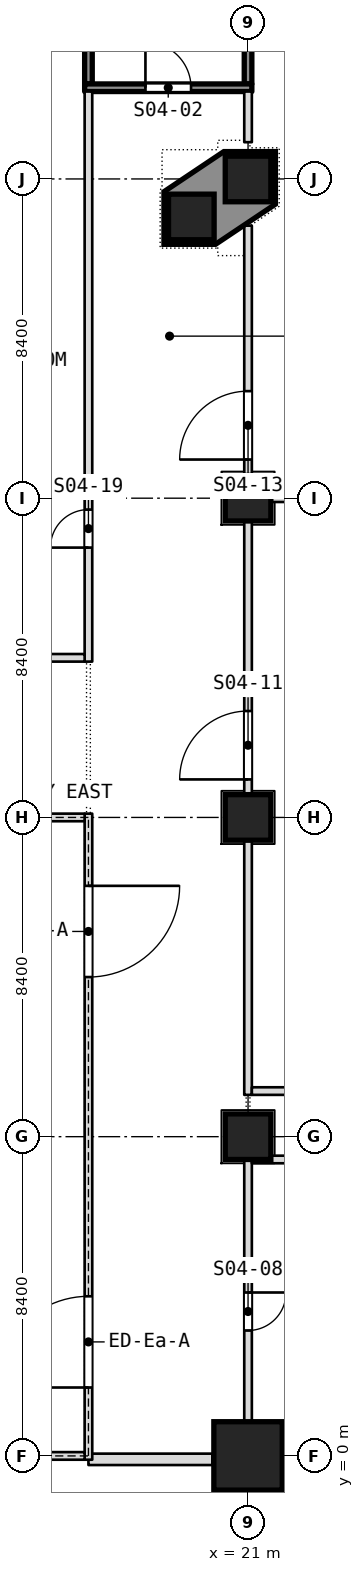
"""IFC4 building model, lengths in metres.
Left out: names, types, materials, properties, quantities, classifications, styles, units other than length and angle.
Written with IfcOpenShell. Run it as: python <this file> out.ifc"""

import sys

from ifc_helpers import new_model, si_unit, direction, frame, frame_2d, origin, origin_2d, place, context, subcontext, project, spatial, polyline, rectangle, outline, extrude, element, fill, save


model = new_model("IFC4")
c1 = context("Model", 3, precision=1e-05, world=origin(), true_north=direction((0.0, 1.0)))
c2 = subcontext(c1, "Body", "Model", "MODEL_VIEW")
j1 = project(units=[si_unit("LENGTHUNIT", "METRE"), si_unit("PLANEANGLEUNIT", "RADIAN")], contexts=[c1])
p1 = place(None, origin())
s1 = spatial("IfcSite", under=j1, at=p1, CompositionType="ELEMENT")
p2 = place(p1, origin())
s2 = spatial("IfcBuilding", under=s1, at=p2, CompositionType="ELEMENT")
p3 = place(p2, frame((0.0, 0.0, 21.0)))
s3 = spatial("IfcBuildingStorey", under=s2, at=p3, CompositionType="ELEMENT", Elevation=21.0)
p4 = place(p3, frame((21.0, 0.0, 0.0), z_axis=(0.0, 0.0, 1.0), x_axis=(1.0, 0.0, 0.0)))
e1 = element("IfcColumn", 1, at=p4, inside=s3, PredefinedType="COLUMN", context=c2, shape_type="SweptSolid", body=[
    extrude(rectangle(XDim=1.8, YDim=1.8, at=origin_2d()), origin(), (0.0, 0.0, 1.0), 5.0),
])
for number, where, z_axis, x_axis in (
    (2, (21.0, 8.4, 0.0), (0.0, 0.0, 1.0), (1.0, 0.0, 0.0)),
    (3, (21.0, 16.8, 0.0), (0.0, 0.0, 1.0), (1.0, 0.0, 0.0)),
    (4, (21.0, 25.2, 0.0), (0.0, 0.0, 1.0), (1.0, 0.0, 0.0)),
    (5, (21.0, 33.6, 0.0), (0.0, 0.0, 1.0), (1.0, 0.0, 0.0)),
    (6, (19.507, 32.6, 0.0), (0.0, 0.0, 1.0), (1.0, 0.0, 0.0)),
):
    element("IfcColumn", number, at=place(p3, frame(where, z_axis=z_axis, x_axis=x_axis)), inside=s3, PredefinedType="COLUMN", context=c2, shape_type="SweptSolid", body=[
        extrude(rectangle(XDim=1.2, YDim=1.2, at=origin_2d()), origin(), (0.0, 0.0, 1.0), 5.0),
    ])
p5 = place(p3, frame((21.0, -0.3, 0.0), z_axis=(0.0, 0.0, 1.0), x_axis=(0.0, 1.0, 0.0)))
e7 = element("IfcWall", 7, at=p5, inside=s3, PredefinedType="PARTITIONING", context=c2, shape_type="SweptSolid", body=[
    extrude(rectangle(XDim=8.2, YDim=0.2, at=frame_2d((4.1, 0.0))), origin(), (0.0, 0.0, 1.0), 4.68),
])
p6 = place(p5, frame((3.6, 0.0, 0.0)))
e8 = element("IfcOpeningElement", 8, at=p6, cuts=e7, PredefinedType="OPENING", context=c2, shape_type="SweptSolid", body=[
    extrude(rectangle(XDim=1.0, YDim=2.1, at=frame_2d((0.5, 1.05))), frame((0.0, 0.1, 0.0), z_axis=(0.0, -1.0, 0.0), x_axis=(1.0, 0.0, 0.0)), (0.0, 0.0, 1.0), 0.2),
])
p7 = place(p3, frame((21.0, 9.5, 0.0), z_axis=(0.0, 0.0, 1.0), x_axis=(0.0, 1.0, 0.0)))
e9 = element("IfcWall", 9, at=p7, inside=s3, PredefinedType="PARTITIONING", context=c2, shape_type="SweptSolid", body=[
    extrude(rectangle(XDim=22.871, YDim=0.2, at=frame_2d((11.436, 0.0))), origin(), (0.0, 0.0, 1.0), 4.68),
])
p8 = place(p7, frame((8.3, 0.0, 0.0)))
e10 = element("IfcOpeningElement", 10, at=p8, cuts=e9, PredefinedType="OPENING", context=c2, shape_type="SweptSolid", body=[
    extrude(rectangle(XDim=1.8, YDim=2.1, at=frame_2d((0.9, 1.05))), frame((0.0, 0.1, 0.0), z_axis=(0.0, -1.0, 0.0), x_axis=(1.0, 0.0, 0.0)), (0.0, 0.0, 1.0), 0.2),
])
p9 = place(p7, frame((16.717, 0.0, 0.0)))
e11 = element("IfcOpeningElement", 11, at=p9, cuts=e9, PredefinedType="OPENING", context=c2, shape_type="SweptSolid", body=[
    extrude(rectangle(XDim=1.8, YDim=2.1, at=frame_2d((0.9, 1.05))), frame((0.0, 0.1, 0.0), z_axis=(0.0, -1.0, 0.0), x_axis=(1.0, 0.0, 0.0)), (0.0, 0.0, 1.0), 0.2),
])
p10 = place(p3, frame((21.0, 34.567, 0.0), z_axis=(0.0, 0.0, 1.0), x_axis=(0.0, 1.0, 0.0)))
e12 = element("IfcWall", 12, at=p10, inside=s3, PredefinedType="PARTITIONING", context=c2, shape_type="SweptSolid", body=[
    extrude(rectangle(XDim=1.333, YDim=0.2, at=frame_2d((0.667, 0.0))), origin(), (0.0, 0.0, 1.0), 4.68),
])
p11 = place(p3, frame((21.0, 36.1, 0.0), z_axis=(0.0, 0.0, 1.0), x_axis=(0.0, 1.0, 0.0)))
e13 = element("IfcWall", 13, at=p11, inside=s3, PredefinedType="PARTITIONING", context=c2, shape_type="SweptSolid", body=[
    extrude(rectangle(XDim=6.2, YDim=0.2, at=frame_2d((3.1, 0.0))), origin(), (0.0, 0.0, 1.0), 4.68),
])
p12 = place(p3, frame((16.8, 20.9, 0.0), z_axis=(0.0, 0.0, 1.0), x_axis=(0.0, 1.0, 0.0)))
e14 = element("IfcWall", 14, at=p12, inside=s3, PredefinedType="PARTITIONING", context=c2, shape_type="SweptSolid", body=[
    extrude(rectangle(XDim=15.0, YDim=0.2, at=frame_2d((7.5, 0.0))), origin(), (0.0, 0.0, 1.0), 4.68),
])
p13 = place(p12, frame((3.0, 0.0, 0.0)))
e15 = element("IfcOpeningElement", 15, at=p13, cuts=e14, PredefinedType="OPENING", context=c2, shape_type="SweptSolid", body=[
    extrude(rectangle(XDim=1.0, YDim=2.1, at=frame_2d((0.5, 1.05))), frame((0.0, 0.1, 0.0), z_axis=(0.0, -1.0, 0.0), x_axis=(1.0, 0.0, 0.0)), (0.0, 0.0, 1.0), 0.2),
])
p14 = place(p3, frame((16.8, 36.1, 0.0), z_axis=(0.0, 0.0, 1.0), x_axis=(0.0, 1.0, 0.0)))
e16 = element("IfcWall", 16, at=p14, inside=s3, PredefinedType="PARTITIONING", context=c2, shape_type="SweptSolid", body=[
    extrude(rectangle(XDim=5.84, YDim=0.2, at=frame_2d((2.92, 0.0))), origin(), (0.0, 0.0, 1.0), 4.68),
])
p15 = place(p3, frame((21.1, 7.8, 0.0), z_axis=(0.0, 0.0, 1.0), x_axis=(1.0, 0.0, 0.0)))
e17 = element("IfcWall", 17, at=p15, inside=s3, PredefinedType="PARTITIONING", context=c2, shape_type="SweptSolid", body=[
    extrude(rectangle(XDim=16.64, YDim=0.2, at=frame_2d((8.32, 0.0))), origin(), (0.0, 0.0, 1.0), 4.68),
])
p16 = place(p3, frame((21.1, 9.6, 0.0), z_axis=(0.0, 0.0, 1.0), x_axis=(1.0, 0.0, 0.0)))
e18 = element("IfcWall", 18, at=p16, inside=s3, PredefinedType="PARTITIONING", context=c2, shape_type="SweptSolid", body=[
    extrude(rectangle(XDim=6.4, YDim=0.2, at=frame_2d((3.2, 0.0))), origin(), (0.0, 0.0, 1.0), 4.68),
])
p17 = place(p3, frame((-16.7, 21.0, 0.0), z_axis=(0.0, 0.0, 1.0), x_axis=(1.0, 0.0, 0.0)))
e19 = element("IfcWall", 19, at=p17, inside=s3, PredefinedType="PARTITIONING", context=c2, shape_type="SweptSolid", body=[
    extrude(rectangle(XDim=33.4, YDim=0.2, at=frame_2d((16.7, 0.0))), origin(), (0.0, 0.0, 1.0), 4.68),
])
p18 = place(p17, frame((15.8, 0.0, 0.0)))
e20 = element("IfcOpeningElement", 20, at=p18, cuts=e19, PredefinedType="OPENING", context=c2, shape_type="SweptSolid", body=[
    extrude(rectangle(XDim=1.8, YDim=2.1, at=frame_2d((0.9, 1.05))), frame((0.0, 0.1, 0.0), z_axis=(0.0, -1.0, 0.0), x_axis=(1.0, 0.0, 0.0)), (0.0, 0.0, 1.0), 0.2),
])
p19 = place(p3, frame((21.1, 25.2, 0.0), z_axis=(0.0, 0.0, 1.0), x_axis=(1.0, 0.0, 0.0)))
e21 = element("IfcWall", 21, at=p19, inside=s3, PredefinedType="PARTITIONING", context=c2, shape_type="SweptSolid", body=[
    extrude(rectangle(XDim=6.58, YDim=0.2, at=frame_2d((3.29, 0.0))), origin(), (0.0, 0.0, 1.0), 4.68),
])
p20 = place(p3, frame((16.7, 36.0, 0.0), z_axis=(0.0, 0.0, 1.0), x_axis=(1.0, 0.0, 0.0)))
e22 = element("IfcWall", 22, at=p20, inside=s3, PredefinedType="PARTITIONING", context=c2, shape_type="SweptSolid", body=[
    extrude(rectangle(XDim=4.4, YDim=0.2, at=frame_2d((2.2, 0.0))), origin(), (0.0, 0.0, 1.0), 4.68),
])
p21 = place(p20, frame((1.6, 0.0, 0.0)))
e23 = element("IfcOpeningElement", 23, at=p21, cuts=e22, PredefinedType="OPENING", context=c2, shape_type="SweptSolid", body=[
    extrude(rectangle(XDim=1.2, YDim=2.1, at=frame_2d((0.6, 1.05))), frame((0.0, 0.1, 0.0), z_axis=(0.0, -1.0, 0.0), x_axis=(1.0, 0.0, 0.0)), (0.0, 0.0, 1.0), 0.2),
])
p22 = place(p3, frame((16.8, -0.09, 0.0), z_axis=(0.0, 0.0, 1.0), x_axis=(1.0, 0.0, 0.0)))
e24 = element("IfcWall", 24, at=p22, inside=s3, PredefinedType="NOTDEFINED", context=c2, shape_type="SweptSolid", body=[
    extrude(rectangle(XDim=3.26, YDim=0.3, at=frame_2d((1.63, 0.0))), origin(), (0.0, 0.0, 1.0), 5.0),
])
p23 = place(p3, frame((21.94, -0.09, 0.0), z_axis=(0.0, 0.0, 1.0), x_axis=(1.0, 0.0, 0.0)))
e25 = element("IfcWall", 25, at=p23, inside=s3, PredefinedType="NOTDEFINED", context=c2, shape_type="SweptSolid", body=[
    extrude(rectangle(XDim=4.483, YDim=0.3, at=frame_2d((2.242, 0.0))), origin(), (0.0, 0.0, 1.0), 3.78),
])
p24 = place(p3, frame((16.8, -0.1, 0.0), z_axis=(0.0, 0.0, 1.0), x_axis=(0.0, 1.0, 0.0)))
e26 = element("IfcWall", 26, at=p24, inside=s3, PredefinedType="PARTITIONING", context=c2, shape_type="SweptSolid", body=[
    extrude(rectangle(XDim=17.0, YDim=0.2, at=frame_2d((8.5, 0.0))), origin(), (0.0, 0.0, 1.0), 4.78),
])
p25 = place(p24, frame((1.9, 0.0, 0.0)))
e27 = element("IfcOpeningElement", 27, at=p25, cuts=e26, PredefinedType="OPENING", context=c2, shape_type="SweptSolid", body=[
    extrude(rectangle(XDim=2.4, YDim=2.1, at=frame_2d((1.2, 1.05))), frame((0.0, 0.1, 0.0), z_axis=(0.0, -1.0, 0.0), x_axis=(1.0, 0.0, 0.0)), (0.0, 0.0, 1.0), 0.2),
])
p26 = place(p24, frame((12.7, 0.0, 0.0)))
e28 = element("IfcOpeningElement", 28, at=p26, cuts=e26, PredefinedType="OPENING", context=c2, shape_type="SweptSolid", body=[
    extrude(rectangle(XDim=2.4, YDim=2.1, at=frame_2d((1.2, 1.05))), frame((0.0, 0.1, 0.0), z_axis=(0.0, -1.0, 0.0), x_axis=(1.0, 0.0, 0.0)), (0.0, 0.0, 1.0), 0.2),
])
for number, where, z_axis, x_axis in (
    (29, (12.6, 0.0, 0.0), (0.0, 0.0, 1.0), (1.0, 0.0, 0.0)),
    (30, (12.6, 16.8, 0.0), (0.0, 0.0, 1.0), (1.0, 0.0, 0.0)),
):
    element("IfcWall", number, at=place(p3, frame(where, z_axis=z_axis, x_axis=x_axis)), inside=s3, PredefinedType="PARTITIONING", context=c2, shape_type="SweptSolid", body=[
        extrude(rectangle(XDim=4.1, YDim=0.2, at=frame_2d((2.05, 0.0))), origin(), (0.0, 0.0, 1.0), 4.78),
    ])
p27 = place(p3, origin())
e31 = element("IfcWall", 31, at=p27, inside=s3, PredefinedType="SOLIDWALL", context=c2, shape_type="SweptSolid", body=[
    extrude(outline(polyline([(20.364, 34.32), (21.72, 34.32), (21.72, 32.936), (20.143, 31.88), (18.787, 31.88), (18.787, 33.264), (20.364, 34.32)]), holes=[polyline([(21.6, 33.0), (21.6, 34.2), (20.4, 34.2), (20.4, 33.0), (21.6, 33.0)]), polyline([(20.107, 32.0), (20.107, 33.2), (18.907, 33.2), (18.907, 32.0), (20.107, 32.0)])]), origin(), (0.0, 0.0, 1.0), 5.0),
])
p28 = place(p21, origin())
e32 = element("IfcDoor", 32, at=p28, inside=s3, OperationType="SINGLE_SWING_LEFT", PredefinedType="DOOR", context=c2, shape_type="SweptSolid", body=[
    extrude(rectangle(XDim=1.2, YDim=2.1, at=frame_2d((0.6, 1.05))), frame((0.0, 0.025, 0.0), z_axis=(0.0, -1.0, 0.0), x_axis=(1.0, 0.0, 0.0)), (0.0, 0.0, 1.0), 0.05),
])
fill(e23, e32)
p29 = place(p6, origin())
e33 = element("IfcDoor", 33, at=p29, inside=s3, OperationType="SINGLE_SWING_RIGHT", PredefinedType="DOOR", context=c2, shape_type="SweptSolid", body=[
    extrude(rectangle(XDim=1.0, YDim=2.1, at=frame_2d((0.5, 1.05))), frame((0.0, 0.025, 0.0), z_axis=(0.0, -1.0, 0.0), x_axis=(1.0, 0.0, 0.0)), (0.0, 0.0, 1.0), 0.05),
])
fill(e8, e33)
p30 = place(p8, origin())
e34 = element("IfcDoor", 34, at=p30, inside=s3, OperationType="DOUBLE_DOOR_SINGLE_SWING", PredefinedType="DOOR", context=c2, shape_type="SweptSolid", body=[
    extrude(rectangle(XDim=1.8, YDim=2.1, at=frame_2d((0.9, 1.05))), frame((0.0, 0.025, 0.0), z_axis=(0.0, -1.0, 0.0), x_axis=(1.0, 0.0, 0.0)), (0.0, 0.0, 1.0), 0.05),
])
fill(e10, e34)
p31 = place(p9, origin())
e35 = element("IfcDoor", 35, at=p31, inside=s3, OperationType="DOUBLE_DOOR_SINGLE_SWING", PredefinedType="DOOR", context=c2, shape_type="SweptSolid", body=[
    extrude(rectangle(XDim=1.8, YDim=2.1, at=frame_2d((0.9, 1.05))), frame((0.0, 0.025, 0.0), z_axis=(0.0, -1.0, 0.0), x_axis=(1.0, 0.0, 0.0)), (0.0, 0.0, 1.0), 0.05),
])
fill(e11, e35)
p32 = place(p13, origin())
e36 = element("IfcDoor", 36, at=p32, inside=s3, OperationType="SINGLE_SWING_RIGHT", PredefinedType="DOOR", context=c2, shape_type="SweptSolid", body=[
    extrude(rectangle(XDim=1.0, YDim=2.1, at=frame_2d((0.5, 1.05))), frame((0.0, 0.025, 0.0), z_axis=(0.0, -1.0, 0.0), x_axis=(1.0, 0.0, 0.0)), (0.0, 0.0, 1.0), 0.05),
])
fill(e15, e36)
p33 = place(p25, origin())
e37 = element("IfcDoor", 37, at=p33, inside=s3, OperationType="DOUBLE_DOOR_SINGLE_SWING", PredefinedType="DOOR", context=c2, shape_type="SweptSolid", body=[
    extrude(rectangle(XDim=2.4, YDim=2.1, at=frame_2d((1.2, 1.05))), frame((0.0, 0.025, 0.0), z_axis=(0.0, -1.0, 0.0), x_axis=(1.0, 0.0, 0.0)), (0.0, 0.0, 1.0), 0.05),
])
fill(e27, e37)
p34 = place(p26, origin())
e38 = element("IfcDoor", 38, at=p34, inside=s3, OperationType="DOUBLE_DOOR_SINGLE_SWING", PredefinedType="DOOR", context=c2, shape_type="SweptSolid", body=[
    extrude(rectangle(XDim=2.4, YDim=2.1, at=frame_2d((1.2, 1.05))), frame((0.0, 0.025, 0.0), z_axis=(0.0, -1.0, 0.0), x_axis=(1.0, 0.0, 0.0)), (0.0, 0.0, 1.0), 0.05),
])
fill(e28, e38)
save(model, sys.argv[1])
